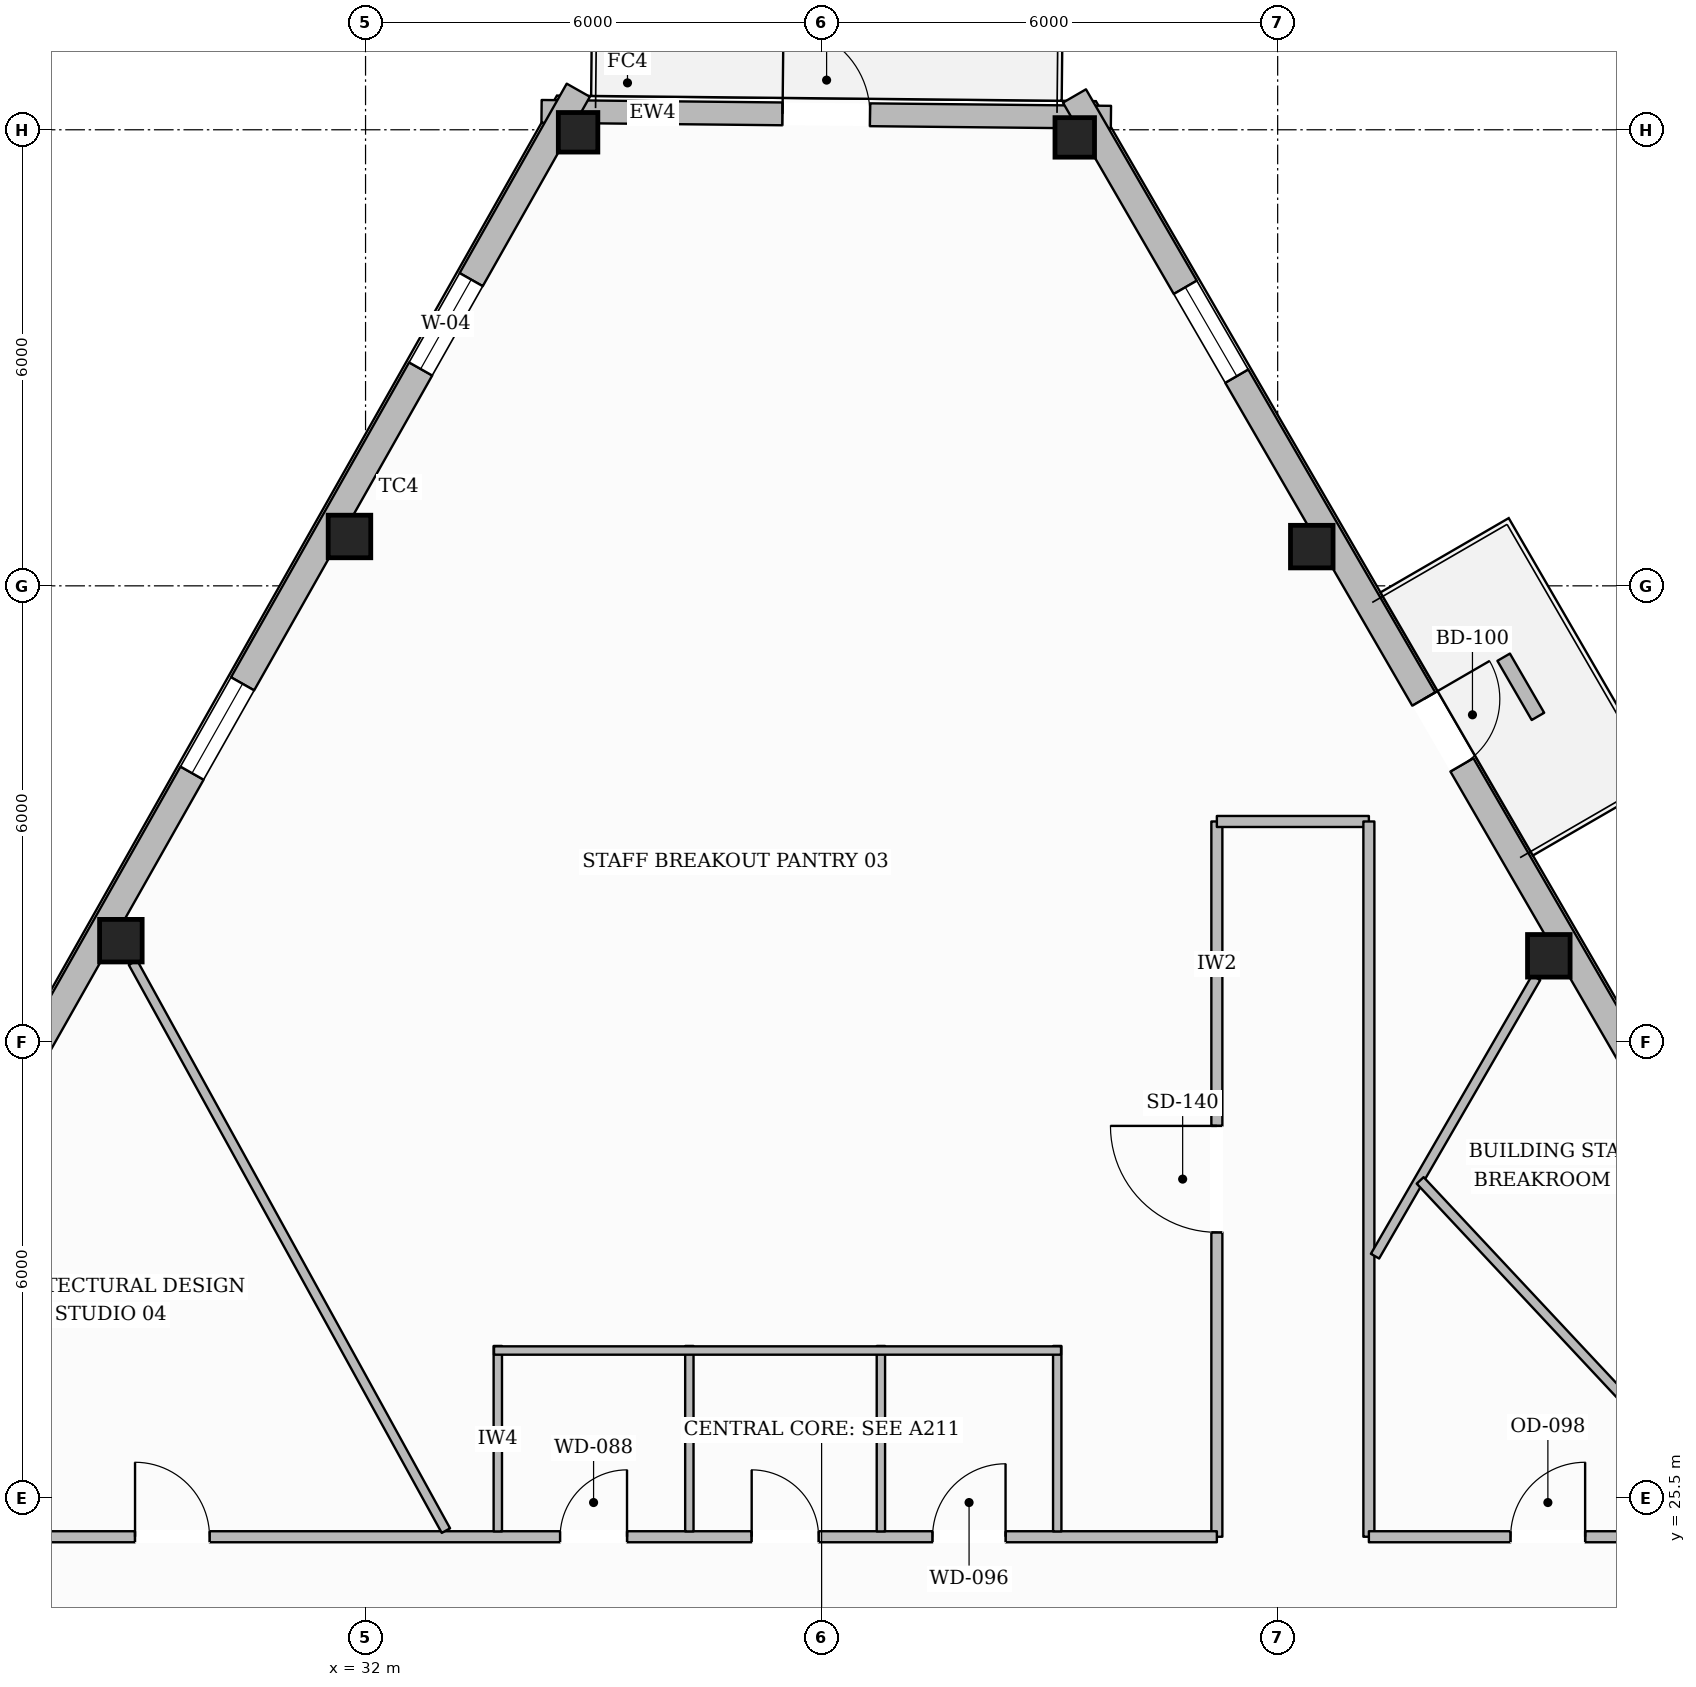
"""IFC4 building model, lengths in metres.
Left out: names, types, materials, properties, quantities, classifications, styles, units other than length and angle.
Written with IfcOpenShell. Run it as: python <this file> out.ifc"""

import sys

from ifc_helpers import new_model, si_unit, direction, frame, frame_2d, origin, origin_2d, place, context, subcontext, project, spatial, rectangle, hollow_rectangle, extrude, element, fill, save


model = new_model("IFC4")
c1 = context("Model", 3, precision=1e-05, world=origin(), true_north=direction((0.0, 1.0)))
c2 = subcontext(c1, "Body", "Model", "MODEL_VIEW")
j1 = project(units=[si_unit("LENGTHUNIT", "METRE"), si_unit("PLANEANGLEUNIT", "RADIAN")], contexts=[c1])
p1 = place(None, origin())
s1 = spatial("IfcSite", under=j1, at=p1, CompositionType="ELEMENT")
p2 = place(p1, origin())
s2 = spatial("IfcBuilding", under=s1, at=p2, CompositionType="ELEMENT")
p3 = place(p2, frame((0.0, 0.0, 247.2)))
s3 = spatial("IfcBuildingStorey", under=s2, at=p3, CompositionType="ELEMENT", Elevation=247.2)
p4 = place(p3, frame((34.796, 43.467, 0.0), z_axis=(0.0, 0.0, 1.0), x_axis=(1.0, 0.0, 0.0)))
e1 = element("IfcColumn", 1, at=p4, inside=s3, PredefinedType="COLUMN", context=c2, shape_type="SweptSolid", body=[
    extrude(hollow_rectangle(XDim=0.52, YDim=0.52, WallThickness=0.024, at=origin_2d()), origin(), (0.0, 0.0, 1.0), 3.61),
])
for number, where, z_axis, x_axis in (
    (2, (31.789, 38.149, 0.0), (0.0, 0.0, 1.0), (1.0, 0.0, 0.0)),
    (3, (28.781, 32.832, 0.0), (0.0, 0.0, 1.0), (1.0, 0.0, 0.0)),
    (4, (47.567, 32.633, 0.0), (0.0, 0.0, 1.0), (1.0, 0.0, 0.0)),
    (5, (44.449, 38.016, 0.0), (0.0, 0.0, 1.0), (1.0, 0.0, 0.0)),
):
    element("IfcColumn", number, at=place(p3, frame(where, z_axis=z_axis, x_axis=x_axis)), inside=s3, PredefinedType="COLUMN", context=c2, shape_type="SweptSolid", body=[
        extrude(hollow_rectangle(XDim=0.56, YDim=0.56, WallThickness=0.025, at=origin_2d()), origin(), (0.0, 0.0, 1.0), 3.61),
    ])
p5 = place(p3, frame((41.33, 43.4, 0.0), z_axis=(0.0, 0.0, 1.0), x_axis=(1.0, 0.0, 0.0)))
e6 = element("IfcColumn", 6, at=p5, inside=s3, PredefinedType="COLUMN", context=c2, shape_type="SweptSolid", body=[
    extrude(hollow_rectangle(XDim=0.52, YDim=0.52, WallThickness=0.024, at=origin_2d()), origin(), (0.0, 0.0, 1.0), 3.61),
])
p6 = place(p3, frame((34.316, 43.742, 0.0), z_axis=(0.0, 0.0, 1.0), x_axis=(0.999946967477, -0.010298652035, 0.0)))
e7 = element("IfcWall", 7, at=p6, inside=s3, PredefinedType="STANDARD", context=c2, shape_type="SweptSolid", body=[
    extrude(rectangle(XDim=7.491, YDim=0.3, at=frame_2d((3.746, 0.0))), origin(), (0.0, 0.0, 1.0), 3.196),
])
p7 = place(p6, frame((3.171, 0.0, 0.0)))
e8 = element("IfcOpeningElement", 8, at=p7, cuts=e7, PredefinedType="OPENING", context=c2, shape_type="SweptSolid", body=[
    extrude(rectangle(XDim=1.15, YDim=2.2, at=frame_2d((0.575, 1.1))), frame((0.0, 0.16, 0.0), z_axis=(0.0, -1.0, 0.0), x_axis=(1.0, 0.0, 0.0)), (0.0, 0.0, 1.0), 0.32),
])
p8 = place(p3, frame((16.282, 11.281, 0.0), z_axis=(0.0, 0.0, 1.0), x_axis=(0.492304911919, 0.870422813178, 0.0)))
e9 = element("IfcWall", 9, at=p8, inside=s3, PredefinedType="STANDARD", context=c2, shape_type="SweptSolid", body=[
    extrude(rectangle(XDim=37.613, YDim=0.35, at=frame_2d((18.807, 0.0))), origin(), (0.0, 0.0, 1.0), 3.196),
])
p9 = place(p8, frame((9.003, 0.0, 0.0)))
e10 = element("IfcOpeningElement", 10, at=p9, cuts=e9, PredefinedType="OPENING", context=c2, shape_type="SweptSolid", body=[
    extrude(rectangle(XDim=1.0, YDim=2.2, at=frame_2d((0.5, 1.1))), frame((0.0, 0.185, 0.0), z_axis=(0.0, -1.0, 0.0), x_axis=(1.0, 0.0, 0.0)), (0.0, 0.0, 1.0), 0.37),
])
p10 = place(p8, frame((33.4, 0.0, 0.65)))
e11 = element("IfcOpeningElement", 11, at=p10, cuts=e9, PredefinedType="OPENING", context=c2, shape_type="SweptSolid", body=[
    extrude(rectangle(XDim=1.35, YDim=1.75, at=frame_2d((0.675, 0.875))), frame((0.0, 0.185, 0.0), z_axis=(0.0, -1.0, 0.0), x_axis=(1.0, 0.0, 0.0)), (0.0, 0.0, 1.0), 0.37),
])
p11 = place(p8, frame((27.291, 0.0, 0.65)))
e12 = element("IfcOpeningElement", 12, at=p11, cuts=e9, PredefinedType="OPENING", context=c2, shape_type="SweptSolid", body=[
    extrude(rectangle(XDim=1.35, YDim=1.75, at=frame_2d((0.675, 0.875))), frame((0.0, 0.185, 0.0), z_axis=(0.0, -1.0, 0.0), x_axis=(1.0, 0.0, 0.0)), (0.0, 0.0, 1.0), 0.37),
])
p12 = place(p8, frame((21.182, 0.0, 0.65)))
e13 = element("IfcOpeningElement", 13, at=p12, cuts=e9, PredefinedType="OPENING", context=c2, shape_type="SweptSolid", body=[
    extrude(rectangle(XDim=1.35, YDim=1.75, at=frame_2d((0.675, 0.875))), frame((0.0, 0.185, 0.0), z_axis=(0.0, -1.0, 0.0), x_axis=(1.0, 0.0, 0.0)), (0.0, 0.0, 1.0), 0.37),
])
p13 = place(p8, frame((2.854, 0.0, 0.65)))
e14 = element("IfcOpeningElement", 14, at=p13, cuts=e9, PredefinedType="OPENING", context=c2, shape_type="SweptSolid", body=[
    extrude(rectangle(XDim=1.35, YDim=1.75, at=frame_2d((0.675, 0.875))), frame((0.0, 0.185, 0.0), z_axis=(0.0, -1.0, 0.0), x_axis=(1.0, 0.0, 0.0)), (0.0, 0.0, 1.0), 0.37),
])
p14 = place(p3, frame((41.327, 43.945, 0.0), z_axis=(0.0, 0.0, 1.0), x_axis=(0.501242173683, -0.865307045691, 0.0)))
e15 = element("IfcWall", 15, at=p14, inside=s3, PredefinedType="STANDARD", context=c2, shape_type="SweptSolid", body=[
    extrude(rectangle(XDim=38.277, YDim=0.35, at=frame_2d((19.138, 0.0))), origin(), (0.0, 0.0, 1.0), 3.196),
])
p15 = place(p14, frame((9.169, 0.0, 0.0)))
e16 = element("IfcOpeningElement", 16, at=p15, cuts=e15, PredefinedType="OPENING", context=c2, shape_type="SweptSolid", body=[
    extrude(rectangle(XDim=1.0, YDim=2.2, at=frame_2d((0.5, 1.1))), frame((0.0, 0.185, 0.0), z_axis=(0.0, -1.0, 0.0), x_axis=(1.0, 0.0, 0.0)), (0.0, 0.0, 1.0), 0.37),
])
p16 = place(p14, frame((34.016, 0.0, 0.65)))
e17 = element("IfcOpeningElement", 17, at=p16, cuts=e15, PredefinedType="OPENING", context=c2, shape_type="SweptSolid", body=[
    extrude(rectangle(XDim=1.35, YDim=1.75, at=frame_2d((0.675, 0.875))), frame((0.0, 0.185, 0.0), z_axis=(0.0, -1.0, 0.0), x_axis=(1.0, 0.0, 0.0)), (0.0, 0.0, 1.0), 0.37),
])
p17 = place(p14, frame((27.795, 0.0, 0.65)))
e18 = element("IfcOpeningElement", 18, at=p17, cuts=e15, PredefinedType="OPENING", context=c2, shape_type="SweptSolid", body=[
    extrude(rectangle(XDim=1.35, YDim=1.75, at=frame_2d((0.675, 0.875))), frame((0.0, 0.185, 0.0), z_axis=(0.0, -1.0, 0.0), x_axis=(1.0, 0.0, 0.0)), (0.0, 0.0, 1.0), 0.37),
])
p18 = place(p14, frame((21.573, 0.0, 0.65)))
e19 = element("IfcOpeningElement", 19, at=p18, cuts=e15, PredefinedType="OPENING", context=c2, shape_type="SweptSolid", body=[
    extrude(rectangle(XDim=1.35, YDim=1.75, at=frame_2d((0.675, 0.875))), frame((0.0, 0.185, 0.0), z_axis=(0.0, -1.0, 0.0), x_axis=(1.0, 0.0, 0.0)), (0.0, 0.0, 1.0), 0.37),
])
p19 = place(p14, frame((2.909, 0.0, 0.65)))
e20 = element("IfcOpeningElement", 20, at=p19, cuts=e15, PredefinedType="OPENING", context=c2, shape_type="SweptSolid", body=[
    extrude(rectangle(XDim=1.35, YDim=1.75, at=frame_2d((0.675, 0.875))), frame((0.0, 0.185, 0.0), z_axis=(0.0, -1.0, 0.0), x_axis=(1.0, 0.0, 0.0)), (0.0, 0.0, 1.0), 0.37),
])
p20 = place(p3, frame((47.424, 35.782, 0.0), z_axis=(0.0, 0.0, 1.0), x_axis=(-0.501271486133, 0.865290065348, 0.0)))
e21 = element("IfcWall", 21, at=p20, inside=s3, PredefinedType="USERDEFINED", context=c2, shape_type="SweptSolid", body=[
    extrude(rectangle(XDim=0.9, YDim=0.19, at=frame_2d((0.45, 0.0))), origin(), (0.0, 0.0, 1.0), 0.5),
])
p21 = place(p3, frame((43.2, 24.99, 0.0), z_axis=(0.0, 0.0, 1.0), x_axis=(0.0, 1.0, 0.0)))
e22 = element("IfcWall", 22, at=p21, inside=s3, PredefinedType="PARTITIONING", context=c2, shape_type="SweptSolid", body=[
    extrude(rectangle(XDim=9.41, YDim=0.145, at=frame_2d((4.705, 0.0))), origin(), (0.0, 0.0, 1.0), 3.61),
])
p22 = place(p21, frame((4.005, 0.0, 0.0)))
e23 = element("IfcOpeningElement", 23, at=p22, cuts=e22, PredefinedType="OPENING", context=c2, shape_type="SweptSolid", body=[
    extrude(rectangle(XDim=1.4, YDim=2.2, at=frame_2d((0.7, 1.1))), frame((0.0, 0.083, 0.0), z_axis=(0.0, -1.0, 0.0), x_axis=(1.0, 0.0, 0.0)), (0.0, 0.0, 1.0), 0.165),
])
p23 = place(p3, frame((43.2, 34.4, 0.0), z_axis=(0.0, 0.0, 1.0), x_axis=(1.0, 0.0, 0.0)))
e24 = element("IfcWall", 24, at=p23, inside=s3, PredefinedType="PARTITIONING", context=c2, shape_type="SweptSolid", body=[
    extrude(rectangle(XDim=2.0, YDim=0.145, at=frame_2d((1.0, 0.0))), origin(), (0.0, 0.0, 1.0), 3.61),
])
p24 = place(p3, frame((45.2, 34.4, 0.0), z_axis=(0.0, 0.0, 1.0), x_axis=(0.0, -1.0, 0.0)))
e25 = element("IfcWall", 25, at=p24, inside=s3, PredefinedType="PARTITIONING", context=c2, shape_type="SweptSolid", body=[
    extrude(rectangle(XDim=9.41, YDim=0.145, at=frame_2d((4.705, 0.0))), origin(), (0.0, 0.0, 1.0), 3.61),
])
p25 = place(p3, frame((45.2, 24.99, 0.0), z_axis=(0.0, 0.0, 1.0), x_axis=(1.0, 0.0, 0.0)))
e26 = element("IfcWall", 26, at=p25, inside=s3, PredefinedType="PARTITIONING", context=c2, shape_type="SweptSolid", body=[
    extrude(rectangle(XDim=4.71, YDim=0.145, at=frame_2d((2.355, 0.0))), origin(), (0.0, 0.0, 1.0), 3.61),
])
p26 = place(p25, frame((1.865, 0.0, 0.0)))
e27 = element("IfcOpeningElement", 27, at=p26, cuts=e26, PredefinedType="OPENING", context=c2, shape_type="SweptSolid", body=[
    extrude(rectangle(XDim=0.98, YDim=2.15, at=frame_2d((0.49, 1.075))), frame((0.0, 0.083, 0.0), z_axis=(0.0, -1.0, 0.0), x_axis=(1.0, 0.0, 0.0)), (0.0, 0.0, 1.0), 0.165),
])
p27 = place(p3, frame((26.09, 24.99, 0.0), z_axis=(0.0, 0.0, 1.0), x_axis=(1.0, 0.0, 0.0)))
e28 = element("IfcWall", 28, at=p27, inside=s3, PredefinedType="PARTITIONING", context=c2, shape_type="SweptSolid", body=[
    extrude(rectangle(XDim=17.11, YDim=0.145, at=frame_2d((8.555, 0.0))), origin(), (0.0, 0.0, 1.0), 3.61),
])
p28 = place(p27, frame((8.47, 0.0, 0.0)))
e29 = element("IfcOpeningElement", 29, at=p28, cuts=e28, PredefinedType="OPENING", context=c2, shape_type="SweptSolid", body=[
    extrude(rectangle(XDim=0.88, YDim=2.1, at=frame_2d((0.44, 1.05))), frame((0.0, 0.083, 0.0), z_axis=(0.0, -1.0, 0.0), x_axis=(1.0, 0.0, 0.0)), (0.0, 0.0, 1.0), 0.165),
])
p29 = place(p27, frame((10.99, 0.0, 0.0)))
e30 = element("IfcOpeningElement", 30, at=p29, cuts=e28, PredefinedType="OPENING", context=c2, shape_type="SweptSolid", body=[
    extrude(rectangle(XDim=0.88, YDim=2.1, at=frame_2d((0.44, 1.05))), frame((0.0, 0.083, 0.0), z_axis=(0.0, -1.0, 0.0), x_axis=(1.0, 0.0, 0.0)), (0.0, 0.0, 1.0), 0.165),
])
p30 = place(p27, frame((13.37, 0.0, 0.0)))
e31 = element("IfcOpeningElement", 31, at=p30, cuts=e28, PredefinedType="OPENING", context=c2, shape_type="SweptSolid", body=[
    extrude(rectangle(XDim=0.96, YDim=2.1, at=frame_2d((0.48, 1.05))), frame((0.0, 0.083, 0.0), z_axis=(0.0, -1.0, 0.0), x_axis=(1.0, 0.0, 0.0)), (0.0, 0.0, 1.0), 0.165),
])
p31 = place(p27, frame((2.877, 0.0, 0.0)))
e32 = element("IfcOpeningElement", 32, at=p31, cuts=e28, PredefinedType="OPENING", context=c2, shape_type="SweptSolid", body=[
    extrude(rectangle(XDim=0.98, YDim=2.15, at=frame_2d((0.49, 1.075))), frame((0.0, 0.083, 0.0), z_axis=(0.0, -1.0, 0.0), x_axis=(1.0, 0.0, 0.0)), (0.0, 0.0, 1.0), 0.165),
])
for number, where, z_axis, x_axis in (
    (33, (33.74, 25.06, 0.0), (0.0, 0.0, 1.0), (0.0, 1.0, 0.0)),
    (34, (36.26, 25.06, 0.0), (0.0, 0.0, 1.0), (0.0, 1.0, 0.0)),
    (35, (38.78, 25.06, 0.0), (0.0, 0.0, 1.0), (0.0, 1.0, 0.0)),
    (36, (41.1, 25.06, 0.0), (0.0, 0.0, 1.0), (0.0, 1.0, 0.0)),
):
    element("IfcWall", number, at=place(p3, frame(where, z_axis=z_axis, x_axis=x_axis)), inside=s3, PredefinedType="PLUMBINGWALL", context=c2, shape_type="SweptSolid", body=[
        extrude(rectangle(XDim=2.44, YDim=0.11, at=frame_2d((1.22, 0.0))), origin(), (0.0, 0.0, 1.0), 3.61),
    ])
p32 = place(p3, frame((33.69, 27.44, 0.0), z_axis=(0.0, 0.0, 1.0), x_axis=(1.0, 0.0, 0.0)))
e37 = element("IfcWall", 37, at=p32, inside=s3, PredefinedType="PLUMBINGWALL", context=c2, shape_type="SweptSolid", body=[
    extrude(rectangle(XDim=7.46, YDim=0.11, at=frame_2d((3.73, 0.0))), origin(), (0.0, 0.0, 1.0), 3.61),
])
p33 = place(p3, frame((45.281, 28.681, 0.0), z_axis=(0.0, 0.0, 1.0), x_axis=(0.500877108651, 0.8655184123, 0.0)))
e38 = element("IfcWall", 38, at=p33, inside=s3, PredefinedType="PARTITIONING", context=c2, shape_type="SweptSolid", body=[
    extrude(rectangle(XDim=4.233, YDim=0.125, at=frame_2d((2.116, 0.0))), origin(), (0.0, 0.0, 1.0), 3.61),
])
p34 = place(p3, frame((33.057, 25.071, 0.0), z_axis=(0.0, 0.0, 1.0), x_axis=(-0.482588627841, 0.875847142074, 0.0)))
e39 = element("IfcWall", 39, at=p34, inside=s3, PredefinedType="PARTITIONING", context=c2, shape_type="SweptSolid", body=[
    extrude(rectangle(XDim=8.532, YDim=0.125, at=frame_2d((4.266, 0.0))), origin(), (0.0, 0.0, 1.0), 3.246),
])
p35 = place(p3, frame((53.331, 21.709, 0.0), z_axis=(0.0, 0.0, 1.0), x_axis=(-0.683203310533, 0.730228208491, 0.0)))
e40 = element("IfcWall", 40, at=p35, inside=s3, PredefinedType="PARTITIONING", context=c2, shape_type="SweptSolid", body=[
    extrude(rectangle(XDim=10.913, YDim=0.125, at=frame_2d((5.457, 0.0))), origin(), (0.0, 0.0, 1.0), 3.349),
])
p36 = place(p35, frame((5.411, 0.0, 0.0)))
e41 = element("IfcOpeningElement", 41, at=p36, cuts=e40, PredefinedType="OPENING", context=c2, shape_type="SweptSolid", body=[
    extrude(rectangle(XDim=0.98, YDim=2.15, at=frame_2d((0.49, 1.075))), frame((0.0, 0.073, 0.0), z_axis=(0.0, -1.0, 0.0), x_axis=(1.0, 0.0, 0.0)), (0.0, 0.0, 1.0), 0.145),
])
p37 = place(p7, origin())
e42 = element("IfcDoor", 42, at=p37, inside=s3, OperationType="SINGLE_SWING_LEFT", PredefinedType="DOOR", context=c2, shape_type="SweptSolid", body=[
    extrude(rectangle(XDim=1.15, YDim=2.2, at=frame_2d((0.575, 1.1))), frame((0.0, 0.025, 0.0), z_axis=(0.0, -1.0, 0.0), x_axis=(1.0, 0.0, 0.0)), (0.0, 0.0, 1.0), 0.05),
])
fill(e8, e42)
p38 = place(p15, origin())
e43 = element("IfcDoor", 43, at=p38, inside=s3, OperationType="SINGLE_SWING_LEFT", PredefinedType="DOOR", context=c2, shape_type="SweptSolid", body=[
    extrude(rectangle(XDim=1.0, YDim=2.2, at=frame_2d((0.5, 1.1))), frame((0.0, 0.025, 0.0), z_axis=(0.0, -1.0, 0.0), x_axis=(1.0, 0.0, 0.0)), (0.0, 0.0, 1.0), 0.05),
])
fill(e16, e43)
p39 = place(p10, origin())
e44 = element("IfcWindow", 44, at=p39, inside=s3, PartitioningType="SINGLE_PANEL", PredefinedType="WINDOW", context=c2, shape_type="SweptSolid", body=[
    extrude(rectangle(XDim=1.35, YDim=1.75, at=frame_2d((0.675, 0.875))), frame((0.0, 0.03, 0.0), z_axis=(0.0, -1.0, 0.0), x_axis=(1.0, 0.0, 0.0)), (0.0, 0.0, 1.0), 0.06),
])
fill(e11, e44)
p40 = place(p11, origin())
e45 = element("IfcWindow", 45, at=p40, inside=s3, PartitioningType="SINGLE_PANEL", PredefinedType="WINDOW", context=c2, shape_type="SweptSolid", body=[
    extrude(rectangle(XDim=1.35, YDim=1.75, at=frame_2d((0.675, 0.875))), frame((0.0, 0.03, 0.0), z_axis=(0.0, -1.0, 0.0), x_axis=(1.0, 0.0, 0.0)), (0.0, 0.0, 1.0), 0.06),
])
fill(e12, e45)
p41 = place(p19, origin())
e46 = element("IfcWindow", 46, at=p41, inside=s3, PartitioningType="SINGLE_PANEL", PredefinedType="WINDOW", context=c2, shape_type="SweptSolid", body=[
    extrude(rectangle(XDim=1.35, YDim=1.75, at=frame_2d((0.675, 0.875))), frame((0.0, 0.03, 0.0), z_axis=(0.0, -1.0, 0.0), x_axis=(1.0, 0.0, 0.0)), (0.0, 0.0, 1.0), 0.06),
])
fill(e20, e46)
p42 = place(p28, origin())
e47 = element("IfcDoor", 47, at=p42, inside=s3, OperationType="SINGLE_SWING_RIGHT", PredefinedType="DOOR", context=c2, shape_type="SweptSolid", body=[
    extrude(rectangle(XDim=0.88, YDim=2.1, at=frame_2d((0.44, 1.05))), frame((0.0, 0.025, 0.0), z_axis=(0.0, -1.0, 0.0), x_axis=(1.0, 0.0, 0.0)), (0.0, 0.0, 1.0), 0.05),
])
fill(e29, e47)
p43 = place(p29, origin())
e48 = element("IfcDoor", 48, at=p43, inside=s3, OperationType="SINGLE_SWING_LEFT", PredefinedType="DOOR", context=c2, shape_type="SweptSolid", body=[
    extrude(rectangle(XDim=0.88, YDim=2.1, at=frame_2d((0.44, 1.05))), frame((0.0, 0.025, 0.0), z_axis=(0.0, -1.0, 0.0), x_axis=(1.0, 0.0, 0.0)), (0.0, 0.0, 1.0), 0.05),
])
fill(e30, e48)
p44 = place(p30, origin())
e49 = element("IfcDoor", 49, at=p44, inside=s3, OperationType="SINGLE_SWING_RIGHT", PredefinedType="DOOR", context=c2, shape_type="SweptSolid", body=[
    extrude(rectangle(XDim=0.96, YDim=2.1, at=frame_2d((0.48, 1.05))), frame((0.0, 0.025, 0.0), z_axis=(0.0, -1.0, 0.0), x_axis=(1.0, 0.0, 0.0)), (0.0, 0.0, 1.0), 0.05),
])
fill(e31, e49)
p45 = place(p26, origin())
e50 = element("IfcDoor", 50, at=p45, inside=s3, OperationType="SINGLE_SWING_RIGHT", PredefinedType="DOOR", context=c2, shape_type="SweptSolid", body=[
    extrude(rectangle(XDim=0.98, YDim=2.15, at=frame_2d((0.49, 1.075))), frame((0.0, 0.025, 0.0), z_axis=(0.0, -1.0, 0.0), x_axis=(1.0, 0.0, 0.0)), (0.0, 0.0, 1.0), 0.05),
])
fill(e27, e50)
p46 = place(p22, origin())
e51 = element("IfcDoor", 51, at=p46, inside=s3, OperationType="SINGLE_SWING_RIGHT", PredefinedType="DOOR", context=c2, shape_type="SweptSolid", body=[
    extrude(rectangle(XDim=1.4, YDim=2.2, at=frame_2d((0.7, 1.1))), frame((0.0, 0.025, 0.0), z_axis=(0.0, -1.0, 0.0), x_axis=(1.0, 0.0, 0.0)), (0.0, 0.0, 1.0), 0.05),
])
fill(e23, e51)
p47 = place(p31, origin())
e52 = element("IfcDoor", 52, at=p47, inside=s3, OperationType="SINGLE_SWING_LEFT", PredefinedType="DOOR", context=c2, shape_type="SweptSolid", body=[
    extrude(rectangle(XDim=0.98, YDim=2.15, at=frame_2d((0.49, 1.075))), frame((0.0, 0.025, 0.0), z_axis=(0.0, -1.0, 0.0), x_axis=(1.0, 0.0, 0.0)), (0.0, 0.0, 1.0), 0.05),
])
fill(e32, e52)
save(model, sys.argv[1])
